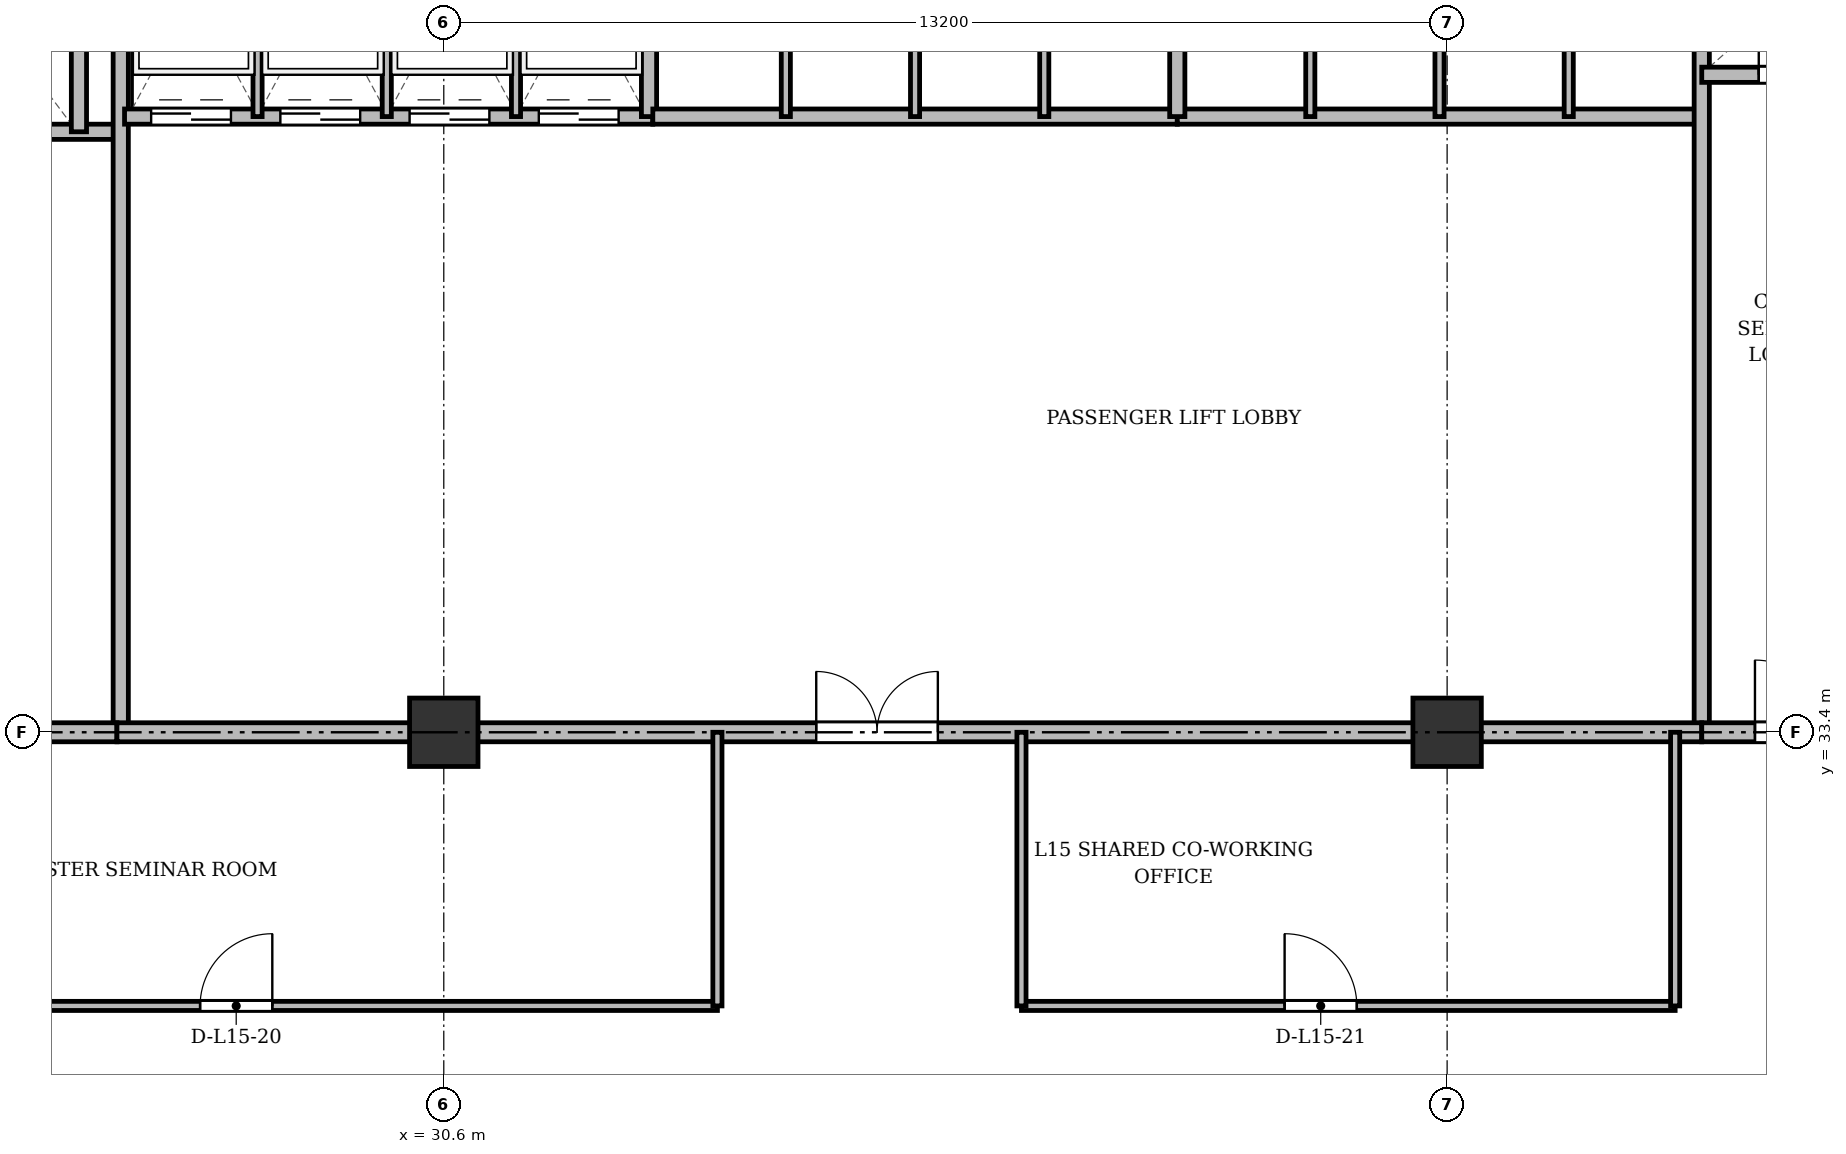
"""IFC4 building model, lengths in metres.
Left out: names, types, materials, properties, quantities, classifications, styles, units other than length and angle.
Written with IfcOpenShell. Run it as: python <this file> out.ifc"""

import sys

from ifc_helpers import new_model, si_unit, direction, frame, frame_2d, origin, origin_2d, place, context, subcontext, project, spatial, rectangle, extrude, source, transform, mapped, element, fill, save


model = new_model("IFC4")
c1 = context("Model", 3, precision=1e-05, world=origin(), true_north=direction((0.0, 1.0)))
c2 = subcontext(c1, "Body", "Model", "MODEL_VIEW")
j1 = project(units=[si_unit("LENGTHUNIT", "METRE"), si_unit("PLANEANGLEUNIT", "RADIAN")], contexts=[c1])
p1 = place(None, origin())
s1 = spatial("IfcSite", under=j1, at=p1, CompositionType="ELEMENT")
p2 = place(p1, origin())
s2 = spatial("IfcBuilding", under=s1, at=p2, CompositionType="ELEMENT")
p3 = place(p2, frame((0.0, 0.0, 59.5)))
s3 = spatial("IfcBuildingStorey", under=s2, at=p3, CompositionType="ELEMENT", Elevation=59.5)
m1 = source(origin(), c2, "Body", "SweptSolid", [
    extrude(rectangle(XDim=0.9, YDim=0.9, at=origin_2d()), origin(), (0.0, 0.0, 1.0), 3.6),
])
for number, where, z_axis, x_axis in (
    (1, (30.6, 33.4, 0.0), (0.0, 0.0, 1.0), (1.0, 0.0, 0.0)),
    (2, (43.8, 33.4, 0.0), (0.0, 0.0, 1.0), (1.0, 0.0, 0.0)),
):
    element("IfcColumn", number, at=place(p3, frame(where, z_axis=z_axis, x_axis=x_axis)), inside=s3, PredefinedType="COLUMN", context=c2, shape_type="MappedRepresentation", body=[
        mapped(m1, transform((0.0, 0.0, 0.0), x_axis=(1.0, 0.0, 0.0), y_axis=(0.0, 1.0, 0.0), z_axis=(0.0, 0.0, 1.0), scale=1.0)),
    ])
p4 = place(p3, frame((19.55, 41.3, 0.0), z_axis=(0.0, 0.0, 1.0), x_axis=(1.0, 0.0, 0.0)))
e3 = element("IfcWall", 3, at=p4, inside=s3, PredefinedType="SOLIDWALL", context=c2, shape_type="SweptSolid", body=[
    extrude(rectangle(XDim=6.75, YDim=0.2, at=frame_2d((3.375, 0.0))), origin(), (0.0, 0.0, 1.0), 3.34),
])
p5 = place(p4, frame((1.7, 0.0, 0.0)))
e4 = element("IfcOpeningElement", 4, at=p5, cuts=e3, PredefinedType="OPENING", context=c2, shape_type="SweptSolid", body=[
    extrude(rectangle(XDim=1.1, YDim=2.15, at=frame_2d((0.55, 1.075))), frame((0.0, 0.11, 0.0), z_axis=(0.0, -1.0, 0.0), x_axis=(1.0, 0.0, 0.0)), (0.0, 0.0, 1.0), 0.22),
])
p6 = place(p4, frame((4.4, 0.0, 0.0)))
e5 = element("IfcOpeningElement", 5, at=p6, cuts=e3, PredefinedType="OPENING", context=c2, shape_type="SweptSolid", body=[
    extrude(rectangle(XDim=1.1, YDim=2.15, at=frame_2d((0.55, 1.075))), frame((0.0, 0.11, 0.0), z_axis=(0.0, -1.0, 0.0), x_axis=(1.0, 0.0, 0.0)), (0.0, 0.0, 1.0), 0.22),
])
p7 = place(p3, frame((25.8, 41.3, 0.0), z_axis=(0.0, 0.0, 1.0), x_axis=(0.0, 1.0, 0.0)))
e6 = element("IfcWall", 6, at=p7, inside=s3, PredefinedType="SOLIDWALL", context=c2, shape_type="SweptSolid", body=[
    extrude(rectangle(XDim=3.4, YDim=0.2, at=frame_2d((1.7, 0.0))), origin(), (0.0, 0.0, 1.0), 3.34),
])
p8 = place(p3, frame((26.35, 33.4, 0.0), z_axis=(0.0, 0.0, 1.0), x_axis=(0.0, 1.0, 0.0)))
e7 = element("IfcWall", 7, at=p8, inside=s3, PredefinedType="SOLIDWALL", context=c2, shape_type="SweptSolid", body=[
    extrude(rectangle(XDim=11.3, YDim=0.2, at=frame_2d((5.65, 0.0))), origin(), (0.0, 0.0, 1.0), 2.69),
])
p9 = place(p3, frame((19.5, 33.4, 0.0), z_axis=(0.0, 0.0, 1.0), x_axis=(1.0, 0.0, 0.0)))
e8 = element("IfcWall", 8, at=p9, inside=s3, PredefinedType="PARTITIONING", context=c2, shape_type="SweptSolid", body=[
    extrude(rectangle(XDim=6.8, YDim=0.25, at=frame_2d((3.4, 0.0))), origin(), (0.0, 0.0, 1.0), 2.69),
])
p10 = place(p9, frame((0.75, 0.0, 0.0)))
e9 = element("IfcOpeningElement", 9, at=p10, cuts=e8, PredefinedType="OPENING", context=c2, shape_type="SweptSolid", body=[
    extrude(rectangle(XDim=1.6, YDim=2.2, at=frame_2d((0.8, 1.1))), frame((0.0, 0.135, 0.0), z_axis=(0.0, -1.0, 0.0), x_axis=(1.0, 0.0, 0.0)), (0.0, 0.0, 1.0), 0.27),
])
p11 = place(p3, frame((26.4, 41.5, 0.0), z_axis=(0.0, 0.0, 1.0), x_axis=(1.0, 0.0, 0.0)))
e10 = element("IfcWall", 10, at=p11, inside=s3, PredefinedType="SOLIDWALL", context=c2, shape_type="SweptSolid", body=[
    extrude(rectangle(XDim=6.95, YDim=0.2, at=frame_2d((3.475, 0.0))), origin(), (0.0, 0.0, 1.0), 3.34),
])
p12 = place(p11, frame((0.35, 0.0, 0.0)))
e11 = element("IfcOpeningElement", 11, at=p12, cuts=e10, PredefinedType="OPENING", context=c2, shape_type="SweptSolid", body=[
    extrude(rectangle(XDim=1.05, YDim=2.15, at=frame_2d((0.525, 1.075))), frame((0.0, 0.11, 0.0), z_axis=(0.0, -1.0, 0.0), x_axis=(1.0, 0.0, 0.0)), (0.0, 0.0, 1.0), 0.22),
])
p13 = place(p11, frame((2.05, 0.0, 0.0)))
e12 = element("IfcOpeningElement", 12, at=p13, cuts=e10, PredefinedType="OPENING", context=c2, shape_type="SweptSolid", body=[
    extrude(rectangle(XDim=1.05, YDim=2.15, at=frame_2d((0.525, 1.075))), frame((0.0, 0.11, 0.0), z_axis=(0.0, -1.0, 0.0), x_axis=(1.0, 0.0, 0.0)), (0.0, 0.0, 1.0), 0.22),
])
p14 = place(p11, frame((3.75, 0.0, 0.0)))
e13 = element("IfcOpeningElement", 13, at=p14, cuts=e10, PredefinedType="OPENING", context=c2, shape_type="SweptSolid", body=[
    extrude(rectangle(XDim=1.05, YDim=2.15, at=frame_2d((0.525, 1.075))), frame((0.0, 0.11, 0.0), z_axis=(0.0, -1.0, 0.0), x_axis=(1.0, 0.0, 0.0)), (0.0, 0.0, 1.0), 0.22),
])
p15 = place(p11, frame((5.45, 0.0, 0.0)))
e14 = element("IfcOpeningElement", 14, at=p15, cuts=e10, PredefinedType="OPENING", context=c2, shape_type="SweptSolid", body=[
    extrude(rectangle(XDim=1.05, YDim=2.15, at=frame_2d((0.525, 1.075))), frame((0.0, 0.11, 0.0), z_axis=(0.0, -1.0, 0.0), x_axis=(1.0, 0.0, 0.0)), (0.0, 0.0, 1.0), 0.22),
])
p16 = place(p3, frame((33.3, 41.5, 0.0), z_axis=(0.0, 0.0, 1.0), x_axis=(0.0, 1.0, 0.0)))
e15 = element("IfcWall", 15, at=p16, inside=s3, PredefinedType="SOLIDWALL", context=c2, shape_type="SweptSolid", body=[
    extrude(rectangle(XDim=3.2, YDim=0.2, at=frame_2d((1.6, 0.0))), origin(), (0.0, 0.0, 1.0), 3.34),
])
for number, where, z_axis, x_axis in (
    (16, (28.15, 41.5, 0.0), (0.0, 0.0, 1.0), (0.0, 1.0, 0.0)),
    (17, (29.85, 41.5, 0.0), (0.0, 0.0, 1.0), (0.0, 1.0, 0.0)),
    (18, (31.55, 41.5, 0.0), (0.0, 0.0, 1.0), (0.0, 1.0, 0.0)),
):
    element("IfcWall", number, at=place(p3, frame(where, z_axis=z_axis, x_axis=x_axis)), inside=s3, PredefinedType="PARTITIONING", context=c2, shape_type="SweptSolid", body=[
        extrude(rectangle(XDim=3.2, YDim=0.12, at=frame_2d((1.6, 0.0))), origin(), (0.0, 0.0, 1.0), 3.34),
    ])
p17 = place(p3, frame((33.35, 41.5, 0.0), z_axis=(0.0, 0.0, 1.0), x_axis=(1.0, 0.0, 0.0)))
e19 = element("IfcWall", 19, at=p17, inside=s3, PredefinedType="SOLIDWALL", context=c2, shape_type="SweptSolid", body=[
    extrude(rectangle(XDim=6.9, YDim=0.2, at=frame_2d((3.45, 0.0))), origin(), (0.0, 0.0, 1.0), 3.34),
])
for number, where, z_axis, x_axis in (
    (20, (35.1, 41.5, 0.0), (0.0, 0.0, 1.0), (0.0, 1.0, 0.0)),
    (21, (36.8, 41.5, 0.0), (0.0, 0.0, 1.0), (0.0, 1.0, 0.0)),
    (22, (38.5, 41.5, 0.0), (0.0, 0.0, 1.0), (0.0, 1.0, 0.0)),
):
    element("IfcWall", number, at=place(p3, frame(where, z_axis=z_axis, x_axis=x_axis)), inside=s3, PredefinedType="PARTITIONING", context=c2, shape_type="SweptSolid", body=[
        extrude(rectangle(XDim=3.2, YDim=0.12, at=frame_2d((1.6, 0.0))), origin(), (0.0, 0.0, 1.0), 3.34),
    ])
p18 = place(p3, frame((40.25, 41.5, 0.0), z_axis=(0.0, 0.0, 1.0), x_axis=(1.0, 0.0, 0.0)))
e23 = element("IfcWall", 23, at=p18, inside=s3, PredefinedType="SOLIDWALL", context=c2, shape_type="SweptSolid", body=[
    extrude(rectangle(XDim=6.9, YDim=0.2, at=frame_2d((3.45, 0.0))), origin(), (0.0, 0.0, 1.0), 2.752),
])
p19 = place(p3, frame((40.25, 41.5, 0.0), z_axis=(0.0, 0.0, 1.0), x_axis=(0.0, 1.0, 0.0)))
e24 = element("IfcWall", 24, at=p19, inside=s3, PredefinedType="SOLIDWALL", context=c2, shape_type="SweptSolid", body=[
    extrude(rectangle(XDim=3.2, YDim=0.2, at=frame_2d((1.6, 0.0))), origin(), (0.0, 0.0, 1.0), 3.34),
])
p20 = place(p3, frame((42.0, 41.5, 0.0), z_axis=(0.0, 0.0, 1.0), x_axis=(0.0, 1.0, 0.0)))
e25 = element("IfcWall", 25, at=p20, inside=s3, PredefinedType="PARTITIONING", context=c2, shape_type="SweptSolid", body=[
    extrude(rectangle(XDim=3.2, YDim=0.12, at=frame_2d((1.6, 0.0))), origin(), (0.0, 0.0, 1.0), 3.34),
])
p21 = place(p3, frame((43.7, 41.5, 0.0), z_axis=(0.0, 0.0, 1.0), x_axis=(0.0, 1.0, 0.0)))
e26 = element("IfcWall", 26, at=p21, inside=s3, PredefinedType="PARTITIONING", context=c2, shape_type="SweptSolid", body=[
    extrude(rectangle(XDim=3.2, YDim=0.12, at=frame_2d((1.6, 0.0))), origin(), (0.0, 0.0, 1.0), 2.752),
])
p22 = place(p3, frame((45.4, 41.5, 0.0), z_axis=(0.0, 0.0, 1.0), x_axis=(0.0, 1.0, 0.0)))
e27 = element("IfcWall", 27, at=p22, inside=s3, PredefinedType="PARTITIONING", context=c2, shape_type="SweptSolid", body=[
    extrude(rectangle(XDim=3.2, YDim=0.12, at=frame_2d((1.6, 0.0))), origin(), (0.0, 0.0, 1.0), 3.34),
])
p23 = place(p3, frame((47.15, 33.4, 0.0), z_axis=(0.0, 0.0, 1.0), x_axis=(0.0, 1.0, 0.0)))
e28 = element("IfcWall", 28, at=p23, inside=s3, PredefinedType="SOLIDWALL", context=c2, shape_type="SweptSolid", body=[
    extrude(rectangle(XDim=11.3, YDim=0.2, at=frame_2d((5.65, 0.0))), origin(), (0.0, 0.0, 1.0), 2.69),
])
p24 = place(p3, frame((26.3, 33.4, 0.0), z_axis=(0.0, 0.0, 1.0), x_axis=(1.0, 0.0, 0.0)))
e29 = element("IfcWall", 29, at=p24, inside=s3, PredefinedType="PARTITIONING", context=c2, shape_type="SweptSolid", body=[
    extrude(rectangle(XDim=20.85, YDim=0.25, at=frame_2d((10.425, 0.0))), origin(), (0.0, 0.0, 1.0), 2.69),
])
p25 = place(p24, frame((9.2, 0.0, 0.0)))
e30 = element("IfcOpeningElement", 30, at=p25, cuts=e29, PredefinedType="OPENING", context=c2, shape_type="SweptSolid", body=[
    extrude(rectangle(XDim=1.6, YDim=2.2, at=frame_2d((0.8, 1.1))), frame((0.0, 0.135, 0.0), z_axis=(0.0, -1.0, 0.0), x_axis=(1.0, 0.0, 0.0)), (0.0, 0.0, 1.0), 0.27),
])
p26 = place(p3, frame((47.15, 42.05, 0.0), z_axis=(0.0, 0.0, 1.0), x_axis=(1.0, 0.0, 0.0)))
e31 = element("IfcWall", 31, at=p26, inside=s3, PredefinedType="SOLIDWALL", context=c2, shape_type="SweptSolid", body=[
    extrude(rectangle(XDim=7.85, YDim=0.2, at=frame_2d((3.925, 0.0))), origin(), (0.0, 0.0, 1.0), 2.752),
])
p27 = place(p26, frame((0.75, 0.0, 0.0)))
e32 = element("IfcOpeningElement", 32, at=p27, cuts=e31, PredefinedType="OPENING", context=c2, shape_type="SweptSolid", body=[
    extrude(rectangle(XDim=0.9, YDim=2.1, at=frame_2d((0.45, 1.05))), frame((0.0, 0.11, 0.0), z_axis=(0.0, -1.0, 0.0), x_axis=(1.0, 0.0, 0.0)), (0.0, 0.0, 1.0), 0.22),
])
p28 = place(p26, frame((3.85, 0.0, 0.0)))
e33 = element("IfcOpeningElement", 33, at=p28, cuts=e31, PredefinedType="OPENING", context=c2, shape_type="SweptSolid", body=[
    extrude(rectangle(XDim=0.9, YDim=2.1, at=frame_2d((0.45, 1.05))), frame((0.0, 0.11, 0.0), z_axis=(0.0, -1.0, 0.0), x_axis=(1.0, 0.0, 0.0)), (0.0, 0.0, 1.0), 0.22),
])
p29 = place(p3, frame((47.15, 33.4, 0.0), z_axis=(0.0, 0.0, 1.0), x_axis=(1.0, 0.0, 0.0)))
e34 = element("IfcWall", 34, at=p29, inside=s3, PredefinedType="PARTITIONING", context=c2, shape_type="SweptSolid", body=[
    extrude(rectangle(XDim=11.15, YDim=0.25, at=frame_2d((5.575, 0.0))), origin(), (0.0, 0.0, 1.0), 2.69),
])
p30 = place(p29, frame((0.7, 0.0, 0.0)))
e35 = element("IfcOpeningElement", 35, at=p30, cuts=e34, PredefinedType="OPENING", context=c2, shape_type="SweptSolid", body=[
    extrude(rectangle(XDim=0.95, YDim=2.15, at=frame_2d((0.475, 1.075))), frame((0.0, 0.135, 0.0), z_axis=(0.0, -1.0, 0.0), x_axis=(1.0, 0.0, 0.0)), (0.0, 0.0, 1.0), 0.27),
])
p31 = place(p29, frame((6.0, 0.0, 0.0)))
e36 = element("IfcOpeningElement", 36, at=p31, cuts=e34, PredefinedType="OPENING", context=c2, shape_type="SweptSolid", body=[
    extrude(rectangle(XDim=1.2, YDim=2.15, at=frame_2d((0.6, 1.075))), frame((0.0, 0.135, 0.0), z_axis=(0.0, -1.0, 0.0), x_axis=(1.0, 0.0, 0.0)), (0.0, 0.0, 1.0), 0.27),
])
p32 = place(p3, frame((22.45, 29.8, 0.0), z_axis=(0.0, 0.0, 1.0), x_axis=(1.0, 0.0, 0.0)))
e37 = element("IfcWall", 37, at=p32, inside=s3, PredefinedType="PARTITIONING", context=c2, shape_type="SweptSolid", body=[
    extrude(rectangle(XDim=11.75, YDim=0.12, at=frame_2d((5.875, 0.0))), origin(), (0.0, 0.0, 1.0), 2.752),
])
p33 = place(p32, frame((4.944, 0.0, 0.0)))
e38 = element("IfcOpeningElement", 38, at=p33, cuts=e37, PredefinedType="OPENING", context=c2, shape_type="SweptSolid", body=[
    extrude(rectangle(XDim=0.95, YDim=2.15, at=frame_2d((0.475, 1.075))), frame((0.0, 0.07, 0.0), z_axis=(0.0, -1.0, 0.0), x_axis=(1.0, 0.0, 0.0)), (0.0, 0.0, 1.0), 0.14),
])
p34 = place(p3, frame((38.2, 29.8, 0.0), z_axis=(0.0, 0.0, 1.0), x_axis=(1.0, 0.0, 0.0)))
e39 = element("IfcWall", 39, at=p34, inside=s3, PredefinedType="PARTITIONING", context=c2, shape_type="SweptSolid", body=[
    extrude(rectangle(XDim=8.6, YDim=0.12, at=frame_2d((4.3, 0.0))), origin(), (0.0, 0.0, 1.0), 2.752),
])
p35 = place(p34, frame((3.462, 0.0, 0.0)))
e40 = element("IfcOpeningElement", 40, at=p35, cuts=e39, PredefinedType="OPENING", context=c2, shape_type="SweptSolid", body=[
    extrude(rectangle(XDim=0.95, YDim=2.15, at=frame_2d((0.475, 1.075))), frame((0.0, 0.07, 0.0), z_axis=(0.0, -1.0, 0.0), x_axis=(1.0, 0.0, 0.0)), (0.0, 0.0, 1.0), 0.14),
])
for number, where, z_axis, x_axis in (
    (41, (34.2, 29.8, 0.0), (0.0, 0.0, 1.0), (0.0, 1.0, 0.0)),
    (42, (38.2, 29.8, 0.0), (0.0, 0.0, 1.0), (0.0, 1.0, 0.0)),
    (43, (46.8, 29.8, 0.0), (0.0, 0.0, 1.0), (0.0, 1.0, 0.0)),
):
    element("IfcWall", number, at=place(p3, frame(where, z_axis=z_axis, x_axis=x_axis)), inside=s3, PredefinedType="PARTITIONING", context=c2, shape_type="SweptSolid", body=[
        extrude(rectangle(XDim=3.6, YDim=0.12, at=frame_2d((1.8, 0.0))), origin(), (0.0, 0.0, 1.0), 2.69),
    ])
m2 = source(origin(), c2, "Body", "SweptSolid", [
    extrude(rectangle(XDim=1.05, YDim=2.15, at=frame_2d((0.525, 1.075))), frame((0.0, 0.025, 0.0), z_axis=(0.0, -1.0, 0.0), x_axis=(1.0, 0.0, 0.0)), (0.0, 0.0, 1.0), 0.05),
])
p36 = place(p12, origin())
e44 = element("IfcDoor", 44, at=p36, inside=s3, OperationType="DOUBLE_DOOR_SLIDING", PredefinedType="DOOR", context=c2, shape_type="MappedRepresentation", body=[
    mapped(m2, transform((0.0, 0.0, 0.0), x_axis=(1.0, 0.0, 0.0), y_axis=(0.0, 1.0, 0.0), z_axis=(0.0, 0.0, 1.0), scale=1.0)),
])
fill(e11, e44)
p37 = place(p13, origin())
e45 = element("IfcDoor", 45, at=p37, inside=s3, OperationType="DOUBLE_DOOR_SLIDING", PredefinedType="DOOR", context=c2, shape_type="MappedRepresentation", body=[
    mapped(m2, transform((0.0, 0.0, 0.0), x_axis=(1.0, 0.0, 0.0), y_axis=(0.0, 1.0, 0.0), z_axis=(0.0, 0.0, 1.0), scale=1.0)),
])
fill(e12, e45)
p38 = place(p14, origin())
e46 = element("IfcDoor", 46, at=p38, inside=s3, OperationType="DOUBLE_DOOR_SLIDING", PredefinedType="DOOR", context=c2, shape_type="MappedRepresentation", body=[
    mapped(m2, transform((0.0, 0.0, 0.0), x_axis=(1.0, 0.0, 0.0), y_axis=(0.0, 1.0, 0.0), z_axis=(0.0, 0.0, 1.0), scale=1.0)),
])
fill(e13, e46)
p39 = place(p15, origin())
e47 = element("IfcDoor", 47, at=p39, inside=s3, OperationType="DOUBLE_DOOR_SLIDING", PredefinedType="DOOR", context=c2, shape_type="MappedRepresentation", body=[
    mapped(m2, transform((0.0, 0.0, 0.0), x_axis=(1.0, 0.0, 0.0), y_axis=(0.0, 1.0, 0.0), z_axis=(0.0, 0.0, 1.0), scale=1.0)),
])
fill(e14, e47)
m3 = source(origin(), c2, "Body", "SweptSolid", [
    extrude(rectangle(XDim=1.6, YDim=2.2, at=frame_2d((0.8, 1.1))), frame((0.0, 0.025, 0.0), z_axis=(0.0, -1.0, 0.0), x_axis=(1.0, 0.0, 0.0)), (0.0, 0.0, 1.0), 0.05),
])
p40 = place(p25, origin())
e48 = element("IfcDoor", 48, at=p40, inside=s3, OperationType="DOUBLE_DOOR_SINGLE_SWING", PredefinedType="DOOR", context=c2, shape_type="MappedRepresentation", body=[
    mapped(m3, transform((0.0, 0.0, 0.0), x_axis=(1.0, 0.0, 0.0), y_axis=(0.0, 1.0, 0.0), z_axis=(0.0, 0.0, 1.0), scale=1.0)),
])
fill(e30, e48)
m4 = source(origin(), c2, "Body", "SweptSolid", [
    extrude(rectangle(XDim=0.9, YDim=2.1, at=frame_2d((0.45, 1.05))), frame((0.0, 0.025, 0.0), z_axis=(0.0, -1.0, 0.0), x_axis=(1.0, 0.0, 0.0)), (0.0, 0.0, 1.0), 0.05),
])
p41 = place(p27, origin())
e49 = element("IfcDoor", 49, at=p41, inside=s3, OperationType="SINGLE_SWING_LEFT", PredefinedType="DOOR", context=c2, shape_type="MappedRepresentation", body=[
    mapped(m4, transform((0.0, 0.0, 0.0), x_axis=(1.0, 0.0, 0.0), y_axis=(0.0, 1.0, 0.0), z_axis=(0.0, 0.0, 1.0), scale=1.0)),
])
fill(e32, e49)
m5 = source(origin(), c2, "Body", "SweptSolid", [
    extrude(rectangle(XDim=0.95, YDim=2.15, at=frame_2d((0.475, 1.075))), frame((0.0, 0.025, 0.0), z_axis=(0.0, -1.0, 0.0), x_axis=(1.0, 0.0, 0.0)), (0.0, 0.0, 1.0), 0.05),
])
p42 = place(p30, origin())
e50 = element("IfcDoor", 50, at=p42, inside=s3, OperationType="SINGLE_SWING_LEFT", PredefinedType="DOOR", context=c2, shape_type="MappedRepresentation", body=[
    mapped(m5, transform((0.0, 0.0, 0.0), x_axis=(1.0, 0.0, 0.0), y_axis=(0.0, 1.0, 0.0), z_axis=(0.0, 0.0, 1.0), scale=1.0)),
])
fill(e35, e50)
p43 = place(p33, origin())
e51 = element("IfcDoor", 51, at=p43, inside=s3, OperationType="SINGLE_SWING_RIGHT", PredefinedType="DOOR", context=c2, shape_type="MappedRepresentation", body=[
    mapped(m5, transform((0.0, 0.0, 0.0), x_axis=(1.0, 0.0, 0.0), y_axis=(0.0, 1.0, 0.0), z_axis=(0.0, 0.0, 1.0), scale=1.0)),
])
fill(e38, e51)
p44 = place(p35, origin())
e52 = element("IfcDoor", 52, at=p44, inside=s3, OperationType="SINGLE_SWING_LEFT", PredefinedType="DOOR", context=c2, shape_type="MappedRepresentation", body=[
    mapped(m5, transform((0.0, 0.0, 0.0), x_axis=(1.0, 0.0, 0.0), y_axis=(0.0, 1.0, 0.0), z_axis=(0.0, 0.0, 1.0), scale=1.0)),
])
fill(e40, e52)
save(model, sys.argv[1])
